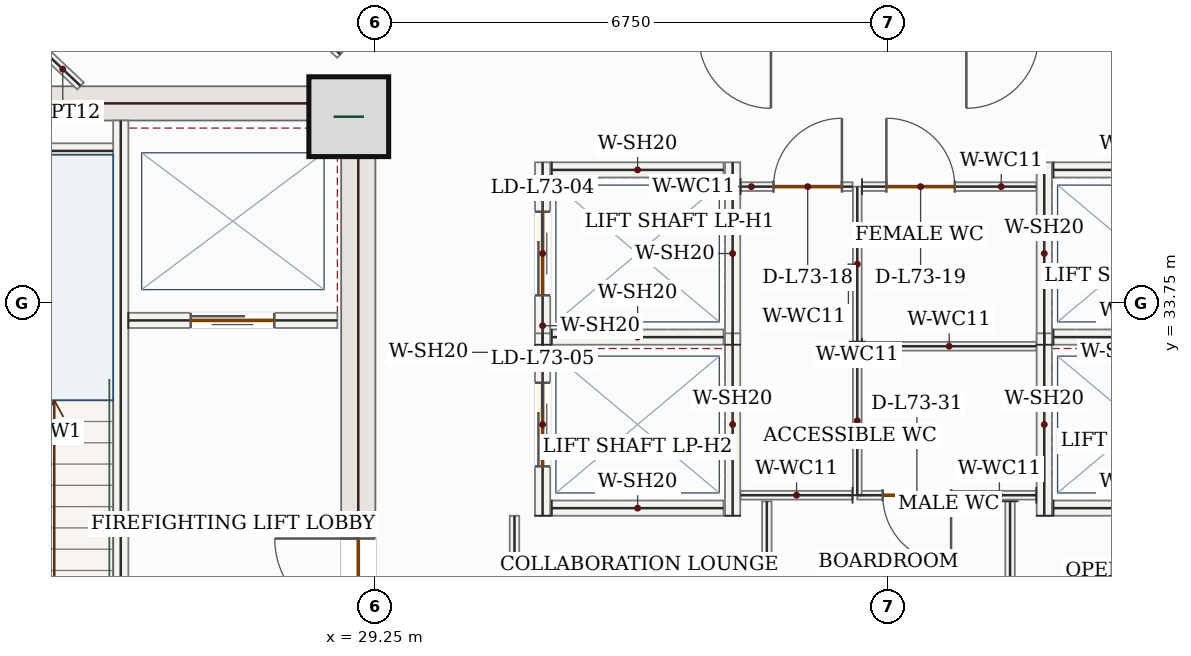
"""IFC4 building model, lengths in metres.
Left out: names, types, materials, properties, quantities, classifications, styles, units other than length and angle.
Written with IfcOpenShell. Run it as: python <this file> out.ifc"""

import sys

from ifc_helpers import new_model, si_unit, direction, frame, frame_2d, origin, origin_2d, place, context, subcontext, project, spatial, rectangle, extrude, source, transform, mapped, element, fill, save


model = new_model("IFC4")
c1 = context("Model", 3, precision=1e-05, world=origin(), true_north=direction((0.0, 1.0)))
c2 = subcontext(c1, "Body", "Model", "MODEL_VIEW")
j1 = project(units=[si_unit("LENGTHUNIT", "METRE"), si_unit("PLANEANGLEUNIT", "RADIAN")], contexts=[c1])
p1 = place(None, origin())
s1 = spatial("IfcSite", under=j1, at=p1, CompositionType="ELEMENT")
p2 = place(p1, origin())
s2 = spatial("IfcBuilding", under=s1, at=p2, CompositionType="ELEMENT")
p3 = place(p2, frame((0.0, 0.0, 302.85)))
s3 = spatial("IfcBuildingStorey", under=s2, at=p3, CompositionType="ELEMENT", Elevation=302.85)
p4 = place(p3, frame((29.025, 28.05, 0.0), z_axis=(0.0, 0.0, 1.0), x_axis=(0.0, 1.0, 0.0)))
e1 = element("IfcWall", 1, at=p4, inside=s3, PredefinedType="SHEAR", context=c2, shape_type="SweptSolid", body=[
    extrude(rectangle(XDim=8.55, YDim=0.45, at=frame_2d((4.275, 0.0))), origin(), (0.0, 0.0, 1.0), 3.5),
])
p5 = place(p4, frame((1.5, 0.0, 0.0)))
e2 = element("IfcOpeningElement", 2, at=p5, cuts=e1, PredefinedType="OPENING", context=c2, shape_type="SweptSolid", body=[
    extrude(rectangle(XDim=1.1, YDim=2.2, at=frame_2d((0.55, 1.1))), frame((0.0, 0.235, 0.0), z_axis=(0.0, -1.0, 0.0), x_axis=(1.0, 0.0, 0.0)), (0.0, 0.0, 1.0), 0.47),
])
m1 = source(origin(), c2, "Body", "SweptSolid", [
    extrude(rectangle(XDim=7.1, YDim=0.45, at=frame_2d((3.55, 0.0))), origin(), (0.0, 0.0, 1.0), 3.5),
])
p6 = place(p3, frame((21.7, 36.375, 0.0), z_axis=(0.0, 0.0, 1.0), x_axis=(1.0, 0.0, 0.0)))
e3 = element("IfcWall", 3, at=p6, inside=s3, PredefinedType="SHEAR", context=c2, shape_type="MappedRepresentation", body=[
    mapped(m1, transform((0.0, 0.0, 0.0), x_axis=(1.0, 0.0, 0.0), y_axis=(0.0, 1.0, 0.0), z_axis=(0.0, 0.0, 1.0), scale=1.0)),
])
m2 = source(origin(), c2, "Body", "SweptSolid", [
    extrude(rectangle(XDim=1.05, YDim=1.05, at=origin_2d()), origin(), (0.0, 0.0, 1.0), 3.75),
])
p7 = place(p3, frame((28.9, 36.2, 0.0), z_axis=(0.0, 0.0, 1.0), x_axis=(1.0, 0.0, 0.0)))
e4 = element("IfcColumn", 4, at=p7, inside=s3, PredefinedType="COLUMN", context=c2, shape_type="MappedRepresentation", body=[
    mapped(m2, transform((0.0, 0.0, 0.0), x_axis=(1.0, 0.0, 0.0), y_axis=(0.0, 1.0, 0.0), z_axis=(0.0, 0.0, 1.0), scale=1.0)),
])
m3 = source(origin(), c2, "Body", "SweptSolid", [
    extrude(rectangle(XDim=10.47, YDim=0.28, at=frame_2d((5.235, 0.0))), origin(), (0.0, 0.0, 1.0), 3.5),
])
p8 = place(p3, frame((18.94, 35.542, 0.0), z_axis=(0.0, 0.0, 1.0), x_axis=(0.690070788875, 0.723741878256, 0.0)))
e5 = element("IfcWall", 5, at=p8, inside=s3, PredefinedType="SOLIDWALL", context=c2, shape_type="MappedRepresentation", body=[
    mapped(m3, transform((0.0, 0.0, 0.0), x_axis=(1.0, 0.0, 0.0), y_axis=(0.0, 1.0, 0.0), z_axis=(0.0, 0.0, 1.0), scale=1.0)),
])
p9 = place(p3, frame((25.9, 28.15, 0.0), z_axis=(0.0, 0.0, 1.0), x_axis=(0.0, 1.0, 0.0)))
e6 = element("IfcWall", 6, at=p9, inside=s3, PredefinedType="SOLIDWALL", context=c2, shape_type="SweptSolid", body=[
    extrude(rectangle(XDim=8.0, YDim=0.2, at=frame_2d((4.0, 0.0))), origin(), (0.0, 0.0, 1.0), 3.5),
])
p10 = place(p9, frame((0.4, 0.0, 0.0)))
e7 = element("IfcOpeningElement", 7, at=p10, cuts=e6, PredefinedType="OPENING", context=c2, shape_type="SweptSolid", body=[
    extrude(rectangle(XDim=1.05, YDim=2.15, at=frame_2d((0.525, 1.075))), frame((0.0, 0.11, 0.0), z_axis=(0.0, -1.0, 0.0), x_axis=(1.0, 0.0, 0.0)), (0.0, 0.0, 1.0), 0.22),
])
m4 = source(origin(), c2, "Body", "SweptSolid", [
    extrude(rectangle(XDim=3.25, YDim=0.2, at=frame_2d((1.625, 0.0))), origin(), (0.0, 0.0, 1.0), 3.5),
])
p11 = place(p3, frame((22.55, 35.75, 0.0), z_axis=(0.0, 0.0, 1.0), x_axis=(1.0, 0.0, 0.0)))
e8 = element("IfcWall", 8, at=p11, inside=s3, PredefinedType="SOLIDWALL", context=c2, shape_type="MappedRepresentation", body=[
    mapped(m4, transform((0.0, 0.0, 0.0), x_axis=(1.0, 0.0, 0.0), y_axis=(0.0, 1.0, 0.0), z_axis=(0.0, 0.0, 1.0), scale=1.0)),
])
p12 = place(p3, frame((26.0, 33.52, 0.0), z_axis=(0.0, 0.0, 1.0), x_axis=(1.0, 0.0, 0.0)))
e9 = element("IfcWall", 9, at=p12, inside=s3, PredefinedType="SOLIDWALL", context=c2, shape_type="SweptSolid", body=[
    extrude(rectangle(XDim=2.75, YDim=0.2, at=frame_2d((1.375, 0.0))), origin(), (0.0, 0.0, 1.0), 3.5),
])
p13 = place(p12, frame((0.82, 0.0, 0.0)))
e10 = element("IfcOpeningElement", 10, at=p13, cuts=e9, PredefinedType="OPENING", context=c2, shape_type="SweptSolid", body=[
    extrude(rectangle(XDim=1.1, YDim=2.15, at=frame_2d((0.55, 1.075))), frame((0.0, 0.11, 0.0), z_axis=(0.0, -1.0, 0.0), x_axis=(1.0, 0.0, 0.0)), (0.0, 0.0, 1.0), 0.22),
])
p14 = place(p3, frame((31.45, 33.2, 0.0), z_axis=(0.0, 0.0, 1.0), x_axis=(0.0, 1.0, 0.0)))
e11 = element("IfcWall", 11, at=p14, inside=s3, PredefinedType="SOLIDWALL", context=c2, shape_type="SweptSolid", body=[
    extrude(rectangle(XDim=2.4, YDim=0.2, at=frame_2d((1.2, 0.0))), origin(), (0.0, 0.0, 1.0), 3.5),
])
p15 = place(p14, frame((0.65, 0.0, 0.0)))
e12 = element("IfcOpeningElement", 12, at=p15, cuts=e11, PredefinedType="OPENING", context=c2, shape_type="SweptSolid", body=[
    extrude(rectangle(XDim=1.1, YDim=2.15, at=frame_2d((0.55, 1.075))), frame((0.0, 0.11, 0.0), z_axis=(0.0, -1.0, 0.0), x_axis=(1.0, 0.0, 0.0)), (0.0, 0.0, 1.0), 0.22),
])
m5 = source(origin(), c2, "Body", "SweptSolid", [
    extrude(rectangle(XDim=2.4, YDim=0.2, at=frame_2d((1.2, 0.0))), origin(), (0.0, 0.0, 1.0), 3.5),
])
p16 = place(p3, frame((33.95, 33.2, 0.0), z_axis=(0.0, 0.0, 1.0), x_axis=(0.0, 1.0, 0.0)))
e13 = element("IfcWall", 13, at=p16, inside=s3, PredefinedType="SOLIDWALL", context=c2, shape_type="MappedRepresentation", body=[
    mapped(m5, transform((0.0, 0.0, 0.0), x_axis=(1.0, 0.0, 0.0), y_axis=(0.0, 1.0, 0.0), z_axis=(0.0, 0.0, 1.0), scale=1.0)),
])
m6 = source(origin(), c2, "Body", "SweptSolid", [
    extrude(rectangle(XDim=2.26, YDim=0.2, at=frame_2d((1.13, 0.0))), origin(), (0.0, 0.0, 1.0), 3.5),
])
for number, where, z_axis, x_axis in (
    (14, (31.57, 33.3, 0.0), (0.0, 0.0, 1.0), (1.0, 0.0, 0.0)),
    (15, (31.57, 35.5, 0.0), (0.0, 0.0, 1.0), (1.0, 0.0, 0.0)),
):
    element("IfcWall", number, at=place(p3, frame(where, z_axis=z_axis, x_axis=x_axis)), inside=s3, PredefinedType="SOLIDWALL", context=c2, shape_type="MappedRepresentation", body=[
        mapped(m6, transform((0.0, 0.0, 0.0), x_axis=(1.0, 0.0, 0.0), y_axis=(0.0, 1.0, 0.0), z_axis=(0.0, 0.0, 1.0), scale=1.0)),
    ])
p17 = place(p3, frame((31.45, 30.95, 0.0), z_axis=(0.0, 0.0, 1.0), x_axis=(0.0, 1.0, 0.0)))
e16 = element("IfcWall", 16, at=p17, inside=s3, PredefinedType="SOLIDWALL", context=c2, shape_type="SweptSolid", body=[
    extrude(rectangle(XDim=2.4, YDim=0.2, at=frame_2d((1.2, 0.0))), origin(), (0.0, 0.0, 1.0), 3.5),
])
p18 = place(p17, frame((0.65, 0.0, 0.0)))
e17 = element("IfcOpeningElement", 17, at=p18, cuts=e16, PredefinedType="OPENING", context=c2, shape_type="SweptSolid", body=[
    extrude(rectangle(XDim=1.1, YDim=2.15, at=frame_2d((0.55, 1.075))), frame((0.0, 0.11, 0.0), z_axis=(0.0, -1.0, 0.0), x_axis=(1.0, 0.0, 0.0)), (0.0, 0.0, 1.0), 0.22),
])
p19 = place(p3, frame((33.95, 30.95, 0.0), z_axis=(0.0, 0.0, 1.0), x_axis=(0.0, 1.0, 0.0)))
e18 = element("IfcWall", 18, at=p19, inside=s3, PredefinedType="SOLIDWALL", context=c2, shape_type="MappedRepresentation", body=[
    mapped(m5, transform((0.0, 0.0, 0.0), x_axis=(1.0, 0.0, 0.0), y_axis=(0.0, 1.0, 0.0), z_axis=(0.0, 0.0, 1.0), scale=1.0)),
])
p20 = place(p3, frame((31.57, 31.05, 0.0), z_axis=(0.0, 0.0, 1.0), x_axis=(1.0, 0.0, 0.0)))
e19 = element("IfcWall", 19, at=p20, inside=s3, PredefinedType="SOLIDWALL", context=c2, shape_type="MappedRepresentation", body=[
    mapped(m6, transform((0.0, 0.0, 0.0), x_axis=(1.0, 0.0, 0.0), y_axis=(0.0, 1.0, 0.0), z_axis=(0.0, 0.0, 1.0), scale=1.0)),
])
p21 = place(p3, frame((38.05, 33.2, 0.0), z_axis=(0.0, 0.0, 1.0), x_axis=(0.0, 1.0, 0.0)))
e20 = element("IfcWall", 20, at=p21, inside=s3, PredefinedType="SOLIDWALL", context=c2, shape_type="MappedRepresentation", body=[
    mapped(m5, transform((0.0, 0.0, 0.0), x_axis=(1.0, 0.0, 0.0), y_axis=(0.0, 1.0, 0.0), z_axis=(0.0, 0.0, 1.0), scale=1.0)),
])
for number, where, z_axis, x_axis in (
    (21, (38.17, 33.3, 0.0), (0.0, 0.0, 1.0), (1.0, 0.0, 0.0)),
    (22, (38.17, 35.5, 0.0), (0.0, 0.0, 1.0), (1.0, 0.0, 0.0)),
):
    element("IfcWall", number, at=place(p3, frame(where, z_axis=z_axis, x_axis=x_axis)), inside=s3, PredefinedType="SOLIDWALL", context=c2, shape_type="MappedRepresentation", body=[
        mapped(m6, transform((0.0, 0.0, 0.0), x_axis=(1.0, 0.0, 0.0), y_axis=(0.0, 1.0, 0.0), z_axis=(0.0, 0.0, 1.0), scale=1.0)),
    ])
p22 = place(p3, frame((38.05, 30.95, 0.0), z_axis=(0.0, 0.0, 1.0), x_axis=(0.0, 1.0, 0.0)))
e23 = element("IfcWall", 23, at=p22, inside=s3, PredefinedType="SOLIDWALL", context=c2, shape_type="MappedRepresentation", body=[
    mapped(m5, transform((0.0, 0.0, 0.0), x_axis=(1.0, 0.0, 0.0), y_axis=(0.0, 1.0, 0.0), z_axis=(0.0, 0.0, 1.0), scale=1.0)),
])
p23 = place(p3, frame((38.17, 31.05, 0.0), z_axis=(0.0, 0.0, 1.0), x_axis=(1.0, 0.0, 0.0)))
e24 = element("IfcWall", 24, at=p23, inside=s3, PredefinedType="SOLIDWALL", context=c2, shape_type="MappedRepresentation", body=[
    mapped(m6, transform((0.0, 0.0, 0.0), x_axis=(1.0, 0.0, 0.0), y_axis=(0.0, 1.0, 0.0), z_axis=(0.0, 0.0, 1.0), scale=1.0)),
])
p24 = place(p3, frame((37.945, 31.22, 0.0), z_axis=(0.0, 0.0, 1.0), x_axis=(-1.0, 0.0, 0.0)))
e25 = element("IfcWall", 25, at=p24, inside=s3, PredefinedType="PARTITIONING", context=c2, shape_type="SweptSolid", body=[
    extrude(rectangle(XDim=2.355, YDim=0.115, at=frame_2d((1.177, 0.0))), origin(), (0.0, 0.0, 1.0), 3.5),
])
p25 = place(p24, frame((1.121, 0.0, 0.0)))
e26 = element("IfcOpeningElement", 26, at=p25, cuts=e25, PredefinedType="OPENING", context=c2, shape_type="SweptSolid", body=[
    extrude(rectangle(XDim=0.9, YDim=2.1, at=frame_2d((0.45, 1.05))), frame((0.0, 0.067, 0.0), z_axis=(0.0, -1.0, 0.0), x_axis=(1.0, 0.0, 0.0)), (0.0, 0.0, 1.0), 0.135),
])
m7 = source(origin(), c2, "Body", "SweptSolid", [
    extrude(rectangle(XDim=1.96, YDim=0.115, at=frame_2d((0.98, 0.0))), origin(), (0.0, 0.0, 1.0), 3.5),
])
p26 = place(p3, frame((35.59, 31.22, 0.0), z_axis=(0.0, 0.0, 1.0), x_axis=(0.0, 1.0, 0.0)))
e27 = element("IfcWall", 27, at=p26, inside=s3, PredefinedType="PARTITIONING", context=c2, shape_type="MappedRepresentation", body=[
    mapped(m7, transform((0.0, 0.0, 0.0), x_axis=(1.0, 0.0, 0.0), y_axis=(0.0, 1.0, 0.0), z_axis=(0.0, 0.0, 1.0), scale=1.0)),
])
m8 = source(origin(), c2, "Body", "SweptSolid", [
    extrude(rectangle(XDim=2.292, YDim=0.115, at=frame_2d((1.146, 0.0))), origin(), (0.0, 0.0, 1.0), 3.5),
])
p27 = place(p3, frame((35.653, 33.18, 0.0), z_axis=(0.0, 0.0, 1.0), x_axis=(1.0, 0.0, 0.0)))
e28 = element("IfcWall", 28, at=p27, inside=s3, PredefinedType="PARTITIONING", context=c2, shape_type="MappedRepresentation", body=[
    mapped(m8, transform((0.0, 0.0, 0.0), x_axis=(1.0, 0.0, 0.0), y_axis=(0.0, 1.0, 0.0), z_axis=(0.0, 0.0, 1.0), scale=1.0)),
])
m9 = source(origin(), c2, "Body", "SweptSolid", [
    extrude(rectangle(XDim=2.04, YDim=0.115, at=frame_2d((1.02, 0.0))), origin(), (0.0, 0.0, 1.0), 3.5),
])
p28 = place(p3, frame((35.59, 33.24, 0.0), z_axis=(0.0, 0.0, 1.0), x_axis=(0.0, 1.0, 0.0)))
e29 = element("IfcWall", 29, at=p28, inside=s3, PredefinedType="PARTITIONING", context=c2, shape_type="MappedRepresentation", body=[
    mapped(m9, transform((0.0, 0.0, 0.0), x_axis=(1.0, 0.0, 0.0), y_axis=(0.0, 1.0, 0.0), z_axis=(0.0, 0.0, 1.0), scale=1.0)),
])
p29 = place(p3, frame((35.653, 35.28, 0.0), z_axis=(0.0, 0.0, 1.0), x_axis=(1.0, 0.0, 0.0)))
e30 = element("IfcWall", 30, at=p29, inside=s3, PredefinedType="PARTITIONING", context=c2, shape_type="SweptSolid", body=[
    extrude(rectangle(XDim=2.292, YDim=0.115, at=frame_2d((1.146, 0.0))), origin(), (0.0, 0.0, 1.0), 3.5),
])
p30 = place(p29, frame((0.32, 0.0, 0.0)))
e31 = element("IfcOpeningElement", 31, at=p30, cuts=e30, PredefinedType="OPENING", context=c2, shape_type="SweptSolid", body=[
    extrude(rectangle(XDim=0.9, YDim=2.1, at=frame_2d((0.45, 1.05))), frame((0.0, 0.067, 0.0), z_axis=(0.0, -1.0, 0.0), x_axis=(1.0, 0.0, 0.0)), (0.0, 0.0, 1.0), 0.135),
])
m10 = source(origin(), c2, "Body", "SweptSolid", [
    extrude(rectangle(XDim=1.473, YDim=0.115, at=frame_2d((0.736, 0.0))), origin(), (0.0, 0.0, 1.0), 3.5),
])
p31 = place(p3, frame((35.528, 31.22, 0.0), z_axis=(0.0, 0.0, 1.0), x_axis=(-1.0, 0.0, 0.0)))
e32 = element("IfcWall", 32, at=p31, inside=s3, PredefinedType="PARTITIONING", context=c2, shape_type="MappedRepresentation", body=[
    mapped(m10, transform((0.0, 0.0, 0.0), x_axis=(1.0, 0.0, 0.0), y_axis=(0.0, 1.0, 0.0), z_axis=(0.0, 0.0, 1.0), scale=1.0)),
])
p32 = place(p3, frame((34.055, 35.28, 0.0), z_axis=(0.0, 0.0, 1.0), x_axis=(1.0, 0.0, 0.0)))
e33 = element("IfcWall", 33, at=p32, inside=s3, PredefinedType="PARTITIONING", context=c2, shape_type="SweptSolid", body=[
    extrude(rectangle(XDim=1.473, YDim=0.115, at=frame_2d((0.736, 0.0))), origin(), (0.0, 0.0, 1.0), 3.5),
])
p33 = place(p32, frame((0.433, 0.0, 0.0)))
e34 = element("IfcOpeningElement", 34, at=p33, cuts=e33, PredefinedType="OPENING", context=c2, shape_type="SweptSolid", body=[
    extrude(rectangle(XDim=0.9, YDim=2.1, at=frame_2d((0.45, 1.05))), frame((0.0, 0.067, 0.0), z_axis=(0.0, -1.0, 0.0), x_axis=(1.0, 0.0, 0.0)), (0.0, 0.0, 1.0), 0.135),
])
p34 = place(p3, frame((23.651, 38.231, 0.0), z_axis=(0.0, 0.0, 1.0), x_axis=(0.726735597886, -0.686917295433, 0.0)))
e35 = element("IfcWall", 35, at=p34, inside=s3, PredefinedType="PARTITIONING", context=c2, shape_type="SweptSolid", body=[
    extrude(rectangle(XDim=2.367, YDim=0.125, at=frame_2d((1.183, 0.0))), origin(), (0.0, 0.0, 1.0), 3.5),
])
p35 = place(p34, frame((0.692, 0.0, 0.0)))
e36 = element("IfcOpeningElement", 36, at=p35, cuts=e35, PredefinedType="OPENING", context=c2, shape_type="SweptSolid", body=[
    extrude(rectangle(XDim=0.88, YDim=2.1, at=frame_2d((0.44, 1.05))), frame((0.0, 0.073, 0.0), z_axis=(0.0, -1.0, 0.0), x_axis=(1.0, 0.0, 0.0)), (0.0, 0.0, 1.0), 0.145),
])
m11 = source(origin(), c2, "Body", "SweptSolid", [
    extrude(rectangle(XDim=3.2, YDim=0.125, at=frame_2d((1.6, 0.0))), origin(), (0.0, 0.0, 1.0), 3.5),
])
for number, where, z_axis, x_axis in (
    (37, (34.4, 27.94, 0.0), (0.0, 0.0, 1.0), (0.0, 1.0, 0.0)),
    (38, (37.6, 31.14, 0.0), (0.0, 0.0, 1.0), (0.0, -1.0, 0.0)),
):
    element("IfcWall", number, at=place(p3, frame(where, z_axis=z_axis, x_axis=x_axis)), inside=s3, PredefinedType="PARTITIONING", context=c2, shape_type="MappedRepresentation", body=[
        mapped(m11, transform((0.0, 0.0, 0.0), x_axis=(1.0, 0.0, 0.0), y_axis=(0.0, 1.0, 0.0), z_axis=(0.0, 0.0, 1.0), scale=1.0)),
    ])
m12 = source(origin(), c2, "Body", "SweptSolid", [
    extrude(rectangle(XDim=2.942, YDim=0.125, at=frame_2d((1.471, 0.0))), origin(), (0.0, 0.0, 1.0), 3.5),
])
p36 = place(p3, frame((31.08, 28.008, 0.0), z_axis=(0.0, 0.0, 1.0), x_axis=(0.0, 1.0, 0.0)))
e39 = element("IfcWall", 39, at=p36, inside=s3, PredefinedType="PARTITIONING", context=c2, shape_type="MappedRepresentation", body=[
    mapped(m12, transform((0.0, 0.0, 0.0), x_axis=(1.0, 0.0, 0.0), y_axis=(0.0, 1.0, 0.0), z_axis=(0.0, 0.0, 1.0), scale=1.0)),
])
p37 = place(p3, frame((24.456, 41.117, 0.0), z_axis=(0.0, 0.0, 1.0), x_axis=(0.726761082497, -0.686890332562, 0.0)))
e40 = element("IfcWall", 40, at=p37, inside=s3, PredefinedType="PARTITIONING", context=c2, shape_type="SweptSolid", body=[
    extrude(rectangle(XDim=5.964, YDim=0.125, at=frame_2d((2.982, 0.0))), origin(), (0.0, 0.0, 1.0), 3.5),
])
p38 = place(p37, frame((1.103, 0.0, 0.0)))
e41 = element("IfcOpeningElement", 41, at=p38, cuts=e40, PredefinedType="OPENING", context=c2, shape_type="SweptSolid", body=[
    extrude(rectangle(XDim=0.95, YDim=2.15, at=frame_2d((0.475, 1.075))), frame((0.0, 0.073, 0.0), z_axis=(0.0, -1.0, 0.0), x_axis=(1.0, 0.0, 0.0)), (0.0, 0.0, 1.0), 0.145),
])
m13 = source(origin(), c2, "Body", "SweptSolid", [
    extrude(rectangle(XDim=1.1, YDim=2.15, at=frame_2d((0.55, 1.075))), frame((0.0, 0.025, 0.0), z_axis=(0.0, -1.0, 0.0), x_axis=(1.0, 0.0, 0.0)), (0.0, 0.0, 1.0), 0.05),
])
p39 = place(p13, origin())
e42 = element("IfcDoor", 42, at=p39, inside=s3, OperationType="DOUBLE_DOOR_SLIDING", PredefinedType="DOOR", context=c2, shape_type="MappedRepresentation", body=[
    mapped(m13, transform((0.0, 0.0, 0.0), x_axis=(1.0, 0.0, 0.0), y_axis=(0.0, 1.0, 0.0), z_axis=(0.0, 0.0, 1.0), scale=1.0)),
])
fill(e10, e42)
m14 = source(origin(), c2, "Body", "SweptSolid", [
    extrude(rectangle(XDim=1.1, YDim=2.2, at=frame_2d((0.55, 1.1))), frame((0.0, 0.025, 0.0), z_axis=(0.0, -1.0, 0.0), x_axis=(1.0, 0.0, 0.0)), (0.0, 0.0, 1.0), 0.05),
])
p40 = place(p5, origin())
e43 = element("IfcDoor", 43, at=p40, inside=s3, OperationType="SINGLE_SWING_RIGHT", PredefinedType="DOOR", context=c2, shape_type="MappedRepresentation", body=[
    mapped(m14, transform((0.0, 0.0, 0.0), x_axis=(1.0, 0.0, 0.0), y_axis=(0.0, 1.0, 0.0), z_axis=(0.0, 0.0, 1.0), scale=1.0)),
])
fill(e2, e43)
p41 = place(p15, origin())
e44 = element("IfcDoor", 44, at=p41, inside=s3, OperationType="DOUBLE_DOOR_SLIDING", PredefinedType="DOOR", context=c2, shape_type="MappedRepresentation", body=[
    mapped(m13, transform((0.0, 0.0, 0.0), x_axis=(1.0, 0.0, 0.0), y_axis=(0.0, 1.0, 0.0), z_axis=(0.0, 0.0, 1.0), scale=1.0)),
])
fill(e12, e44)
p42 = place(p18, origin())
e45 = element("IfcDoor", 45, at=p42, inside=s3, OperationType="DOUBLE_DOOR_SLIDING", PredefinedType="DOOR", context=c2, shape_type="MappedRepresentation", body=[
    mapped(m13, transform((0.0, 0.0, 0.0), x_axis=(1.0, 0.0, 0.0), y_axis=(0.0, 1.0, 0.0), z_axis=(0.0, 0.0, 1.0), scale=1.0)),
])
fill(e17, e45)
m15 = source(origin(), c2, "Body", "SweptSolid", [
    extrude(rectangle(XDim=0.9, YDim=2.1, at=frame_2d((0.45, 1.05))), frame((0.0, 0.025, 0.0), z_axis=(0.0, -1.0, 0.0), x_axis=(1.0, 0.0, 0.0)), (0.0, 0.0, 1.0), 0.05),
])
p43 = place(p33, origin())
e46 = element("IfcDoor", 46, at=p43, inside=s3, OperationType="SINGLE_SWING_RIGHT", PredefinedType="DOOR", context=c2, shape_type="MappedRepresentation", body=[
    mapped(m15, transform((0.0, 0.0, 0.0), x_axis=(1.0, 0.0, 0.0), y_axis=(0.0, 1.0, 0.0), z_axis=(0.0, 0.0, 1.0), scale=1.0)),
])
fill(e34, e46)
p44 = place(p30, origin())
e47 = element("IfcDoor", 47, at=p44, inside=s3, OperationType="SINGLE_SWING_LEFT", PredefinedType="DOOR", context=c2, shape_type="MappedRepresentation", body=[
    mapped(m15, transform((0.0, 0.0, 0.0), x_axis=(1.0, 0.0, 0.0), y_axis=(0.0, 1.0, 0.0), z_axis=(0.0, 0.0, 1.0), scale=1.0)),
])
fill(e31, e47)
p45 = place(p25, origin())
e48 = element("IfcDoor", 48, at=p45, inside=s3, OperationType="SINGLE_SWING_LEFT", PredefinedType="DOOR", context=c2, shape_type="MappedRepresentation", body=[
    mapped(m15, transform((0.0, 0.0, 0.0), x_axis=(1.0, 0.0, 0.0), y_axis=(0.0, 1.0, 0.0), z_axis=(0.0, 0.0, 1.0), scale=1.0)),
])
fill(e26, e48)
save(model, sys.argv[1])
